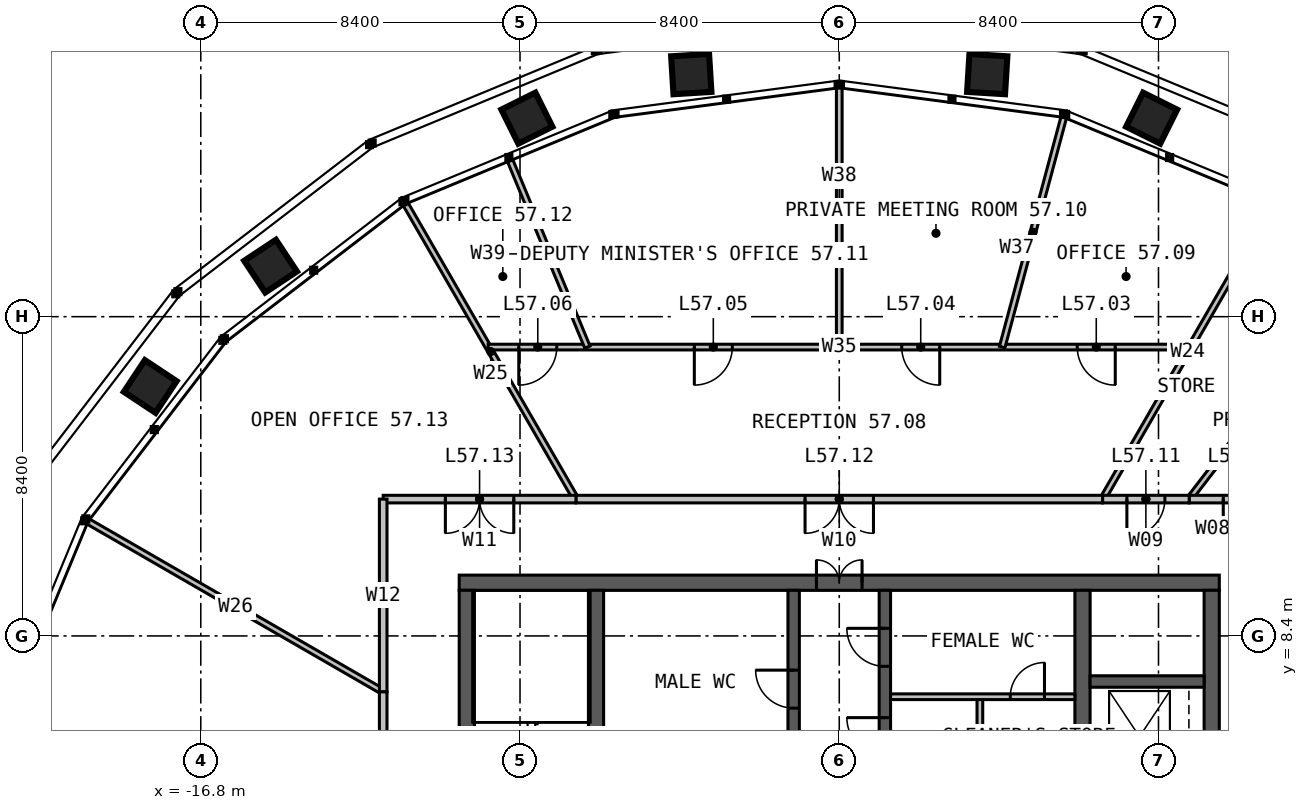
"""IFC4 building model, lengths in metres.
Left out: names, types, materials, properties, quantities, classifications, styles, units other than length and angle.
Written with IfcOpenShell. Run it as: python <this file> out.ifc"""

import sys

from ifc_helpers import new_model, si_unit, direction, frame, frame_2d, origin, place, context, subcontext, project, spatial, rectangle, extrude, element, fill, save


model = new_model("IFC4")
c1 = context("Model", 3, precision=1e-05, world=origin(), true_north=direction((0.0, 1.0)))
c2 = subcontext(c1, "Body", "Model", "MODEL_VIEW")
j1 = project(units=[si_unit("LENGTHUNIT", "METRE"), si_unit("PLANEANGLEUNIT", "RADIAN")], contexts=[c1])
p1 = place(None, origin())
s1 = spatial("IfcSite", under=j1, at=p1, CompositionType="ELEMENT")
p2 = place(p1, origin())
s2 = spatial("IfcBuilding", under=s1, at=p2, CompositionType="ELEMENT")
p3 = place(p2, frame((0.0, 0.0, 236.0)))
s3 = spatial("IfcBuildingStorey", under=s2, at=p3, CompositionType="ELEMENT", Elevation=236.0)
p4 = place(p3, frame((-10.0, 9.8, 0.0), z_axis=(0.0, 0.0, 1.0), x_axis=(1.0, 0.0, 0.0)))
e1 = element("IfcWall", 1, at=p4, inside=s3, PredefinedType="SOLIDWALL", context=c2, shape_type="SweptSolid", body=[
    extrude(rectangle(XDim=20.0, YDim=0.4, at=frame_2d((10.0, 0.0))), origin(), (0.0, 0.0, 1.0), 4.0),
])
p5 = place(p4, frame((9.4, 0.0, 0.0)))
e2 = element("IfcOpeningElement", 2, at=p5, cuts=e1, PredefinedType="OPENING", context=c2, shape_type="SweptSolid", body=[
    extrude(rectangle(XDim=1.2, YDim=2.2, at=frame_2d((0.6, 1.1))), frame((0.0, 0.21, 0.0), z_axis=(0.0, -1.0, 0.0), x_axis=(1.0, 0.0, 0.0)), (0.0, 0.0, 1.0), 0.42),
])
for number, where, z_axis, x_axis in (
    (3, (9.8, -9.6, 0.0), (0.0, 0.0, 1.0), (0.0, 1.0, 0.0)),
    (4, (-9.8, 9.6, 0.0), (0.0, 0.0, 1.0), (0.0, -1.0, 0.0)),
):
    element("IfcWall", number, at=place(p3, frame(where, z_axis=z_axis, x_axis=x_axis)), inside=s3, PredefinedType="SOLIDWALL", context=c2, shape_type="SweptSolid", body=[
        extrude(rectangle(XDim=19.2, YDim=0.4, at=frame_2d((9.6, 0.0))), origin(), (0.0, 0.0, 1.0), 4.0),
    ])
p6 = place(p3, frame((-6.4, -9.6, 0.0), z_axis=(0.0, 0.0, 1.0), x_axis=(0.0, 1.0, 0.0)))
e5 = element("IfcWall", 5, at=p6, inside=s3, PredefinedType="SOLIDWALL", context=c2, shape_type="SweptSolid", body=[
    extrude(rectangle(XDim=19.2, YDim=0.4, at=frame_2d((9.6, 0.0))), origin(), (0.0, 0.0, 1.0), 4.0),
])
p7 = place(p6, frame((9.1, 0.0, 0.0)))
e6 = element("IfcOpeningElement", 6, at=p7, cuts=e5, PredefinedType="OPENING", context=c2, shape_type="SweptSolid", body=[
    extrude(rectangle(XDim=1.0, YDim=2.2, at=frame_2d((0.5, 1.1))), frame((0.0, 0.21, 0.0), z_axis=(0.0, -1.0, 0.0), x_axis=(1.0, 0.0, 0.0)), (0.0, 0.0, 1.0), 0.42),
])
p8 = place(p3, frame((6.4, 9.6, 0.0), z_axis=(0.0, 0.0, 1.0), x_axis=(0.0, -1.0, 0.0)))
e7 = element("IfcWall", 7, at=p8, inside=s3, PredefinedType="SOLIDWALL", context=c2, shape_type="SweptSolid", body=[
    extrude(rectangle(XDim=19.2, YDim=0.4, at=frame_2d((9.6, 0.0))), origin(), (0.0, 0.0, 1.0), 4.0),
])
p9 = place(p8, frame((9.1, 0.0, 0.0)))
e8 = element("IfcOpeningElement", 8, at=p9, cuts=e7, PredefinedType="OPENING", context=c2, shape_type="SweptSolid", body=[
    extrude(rectangle(XDim=1.0, YDim=2.2, at=frame_2d((0.5, 1.1))), frame((0.0, 0.21, 0.0), z_axis=(0.0, -1.0, 0.0), x_axis=(1.0, 0.0, 0.0)), (0.0, 0.0, 1.0), 0.42),
])
p10 = place(p3, frame((-1.2, 1.45, 0.0), z_axis=(0.0, 0.0, 1.0), x_axis=(0.0, 1.0, 0.0)))
e9 = element("IfcWall", 9, at=p10, inside=s3, PredefinedType="SOLIDWALL", context=c2, shape_type="SweptSolid", body=[
    extrude(rectangle(XDim=8.15, YDim=0.3, at=frame_2d((4.075, 0.0))), origin(), (0.0, 0.0, 1.0), 4.0),
])
p11 = place(p10, frame((5.05, 0.0, 0.0)))
e10 = element("IfcOpeningElement", 10, at=p11, cuts=e9, PredefinedType="OPENING", context=c2, shape_type="SweptSolid", body=[
    extrude(rectangle(XDim=1.0, YDim=2.2, at=frame_2d((0.5, 1.1))), frame((0.0, 0.16, 0.0), z_axis=(0.0, -1.0, 0.0), x_axis=(1.0, 0.0, 0.0)), (0.0, 0.0, 1.0), 0.32),
])
p12 = place(p3, frame((1.2, 1.45, 0.0), z_axis=(0.0, 0.0, 1.0), x_axis=(0.0, 1.0, 0.0)))
e11 = element("IfcWall", 11, at=p12, inside=s3, PredefinedType="SOLIDWALL", context=c2, shape_type="SweptSolid", body=[
    extrude(rectangle(XDim=8.15, YDim=0.3, at=frame_2d((4.075, 0.0))), origin(), (0.0, 0.0, 1.0), 4.0),
])
p13 = place(p12, frame((3.8, 0.0, 0.0)))
e12 = element("IfcOpeningElement", 12, at=p13, cuts=e11, PredefinedType="OPENING", context=c2, shape_type="SweptSolid", body=[
    extrude(rectangle(XDim=1.0, YDim=2.2, at=frame_2d((0.5, 1.1))), frame((0.0, 0.16, 0.0), z_axis=(0.0, -1.0, 0.0), x_axis=(1.0, 0.0, 0.0)), (0.0, 0.0, 1.0), 0.32),
])
p14 = place(p12, frame((6.15, 0.0, 0.0)))
e13 = element("IfcOpeningElement", 13, at=p14, cuts=e11, PredefinedType="OPENING", context=c2, shape_type="SweptSolid", body=[
    extrude(rectangle(XDim=1.0, YDim=2.2, at=frame_2d((0.5, 1.1))), frame((0.0, 0.16, 0.0), z_axis=(0.0, -1.0, 0.0), x_axis=(1.0, 0.0, 0.0)), (0.0, 0.0, 1.0), 0.32),
])
p15 = place(p3, frame((6.6, 7.2, 0.0), z_axis=(0.0, 0.0, 1.0), x_axis=(1.0, 0.0, 0.0)))
e14 = element("IfcWall", 14, at=p15, inside=s3, PredefinedType="SOLIDWALL", context=c2, shape_type="SweptSolid", body=[
    extrude(rectangle(XDim=3.0, YDim=0.3, at=frame_2d((1.5, 0.0))), origin(), (0.0, 0.0, 1.0), 4.0),
])
p16 = place(p3, frame((1.35, 6.8, 0.0), z_axis=(0.0, 0.0, 1.0), x_axis=(1.0, 0.0, 0.0)))
e15 = element("IfcWall", 15, at=p16, inside=s3, PredefinedType="PARTITIONING", context=c2, shape_type="SweptSolid", body=[
    extrude(rectangle(XDim=4.85, YDim=0.15, at=frame_2d((2.425, 0.0))), origin(), (0.0, 0.0, 1.0), 3.75),
])
p17 = place(p16, frame((3.15, 0.0, 0.0)))
e16 = element("IfcOpeningElement", 16, at=p17, cuts=e15, PredefinedType="OPENING", context=c2, shape_type="SweptSolid", body=[
    extrude(rectangle(XDim=0.9, YDim=2.2, at=frame_2d((0.45, 1.1))), frame((0.0, 0.085, 0.0), z_axis=(0.0, -1.0, 0.0), x_axis=(1.0, 0.0, 0.0)), (0.0, 0.0, 1.0), 0.17),
])
p18 = place(p3, frame((3.7, 4.75, 0.0), z_axis=(0.0, 0.0, 1.0), x_axis=(0.0, 1.0, 0.0)))
e17 = element("IfcWall", 17, at=p18, inside=s3, PredefinedType="PARTITIONING", context=c2, shape_type="SweptSolid", body=[
    extrude(rectangle(XDim=1.975, YDim=0.15, at=frame_2d((0.988, 0.0))), origin(), (0.0, 0.0, 1.0), 3.75),
])
p19 = place(p3, frame((9.208, 12.0, 0.0), z_axis=(0.0, 0.0, 1.0), x_axis=(0.608753999833, 0.793359040843, 0.0)))
e18 = element("IfcWall", 18, at=p19, inside=s3, PredefinedType="PARTITIONING", context=c2, shape_type="SweptSolid", body=[
    extrude(rectangle(XDim=7.501, YDim=0.15, at=frame_2d((3.75, 0.0))), origin(), (0.0, 0.0, 1.0), 2.79),
])
for number, where, z_axis, x_axis in (
    (19, (6.928, 12.0, 0.0), (0.0, 0.0, 1.0), (0.5, 0.866, 0.0)),
    (20, (-6.928, 12.0, 0.0), (0.0, 0.0, 1.0), (-0.5, 0.866, 0.0)),
    (21, (-12.0, 6.928, 0.0), (0.0, 0.0, 1.0), (-0.866, 0.5, 0.0)),
):
    element("IfcWall", number, at=place(p3, frame(where, z_axis=z_axis, x_axis=x_axis)), inside=s3, PredefinedType="PARTITIONING", context=c2, shape_type="SweptSolid", body=[
        extrude(rectangle(XDim=8.966, YDim=0.15, at=frame_2d((4.483, 0.0))), origin(), (0.0, 0.0, 1.0), 2.79),
    ])
p20 = place(p3, frame((12.0, 12.0, 0.0), z_axis=(0.0, 0.0, 1.0), x_axis=(-1.0, 0.0, 0.0)))
e22 = element("IfcWall", 22, at=p20, inside=s3, PredefinedType="PARTITIONING", context=c2, shape_type="SweptSolid", body=[
    extrude(rectangle(XDim=2.792, YDim=0.2, at=frame_2d((1.396, 0.0))), origin(), (0.0, 0.0, 1.0), 3.8),
])
p21 = place(p20, frame((0.896, 0.0, 0.0)))
e23 = element("IfcOpeningElement", 23, at=p21, cuts=e22, PredefinedType="OPENING", context=c2, shape_type="SweptSolid", body=[
    extrude(rectangle(XDim=1.0, YDim=2.2, at=frame_2d((0.5, 1.1))), frame((0.0, 0.11, 0.0), z_axis=(0.0, -1.0, 0.0), x_axis=(1.0, 0.0, 0.0)), (0.0, 0.0, 1.0), 0.22),
])
p22 = place(p3, frame((9.208, 12.0, 0.0), z_axis=(0.0, 0.0, 1.0), x_axis=(-1.0, 0.0, 0.0)))
e24 = element("IfcWall", 24, at=p22, inside=s3, PredefinedType="PARTITIONING", context=c2, shape_type="SweptSolid", body=[
    extrude(rectangle(XDim=2.28, YDim=0.2, at=frame_2d((1.14, 0.0))), origin(), (0.0, 0.0, 1.0), 3.8),
])
p23 = place(p22, frame((0.64, 0.0, 0.0)))
e25 = element("IfcOpeningElement", 25, at=p23, cuts=e24, PredefinedType="OPENING", context=c2, shape_type="SweptSolid", body=[
    extrude(rectangle(XDim=1.0, YDim=2.2, at=frame_2d((0.5, 1.1))), frame((0.0, 0.11, 0.0), z_axis=(0.0, -1.0, 0.0), x_axis=(1.0, 0.0, 0.0)), (0.0, 0.0, 1.0), 0.22),
])
p24 = place(p3, frame((9.238, 16.0, 0.0), z_axis=(0.0, 0.0, 1.0), x_axis=(-1.0, 0.0, 0.0)))
e26 = element("IfcWall", 26, at=p24, inside=s3, PredefinedType="PARTITIONING", context=c2, shape_type="SweptSolid", body=[
    extrude(rectangle(XDim=18.475, YDim=0.15, at=frame_2d((9.238, 0.0))), origin(), (0.0, 0.0, 1.0), 2.79),
])
p25 = place(p24, frame((1.975, 0.0, 0.0)))
e27 = element("IfcOpeningElement", 27, at=p25, cuts=e26, PredefinedType="OPENING", context=c2, shape_type="SweptSolid", body=[
    extrude(rectangle(XDim=1.0, YDim=2.2, at=frame_2d((0.5, 1.1))), frame((0.0, 0.085, 0.0), z_axis=(0.0, -1.0, 0.0), x_axis=(1.0, 0.0, 0.0)), (0.0, 0.0, 1.0), 0.17),
])
p26 = place(p24, frame((6.594, 0.0, 0.0)))
e28 = element("IfcOpeningElement", 28, at=p26, cuts=e26, PredefinedType="OPENING", context=c2, shape_type="SweptSolid", body=[
    extrude(rectangle(XDim=1.0, YDim=2.2, at=frame_2d((0.5, 1.1))), frame((0.0, 0.085, 0.0), z_axis=(0.0, -1.0, 0.0), x_axis=(1.0, 0.0, 0.0)), (0.0, 0.0, 1.0), 0.17),
])
p27 = place(p24, frame((12.051, 0.0, 0.0)))
e29 = element("IfcOpeningElement", 29, at=p27, cuts=e26, PredefinedType="OPENING", context=c2, shape_type="SweptSolid", body=[
    extrude(rectangle(XDim=1.0, YDim=2.2, at=frame_2d((0.5, 1.1))), frame((0.0, 0.085, 0.0), z_axis=(0.0, -1.0, 0.0), x_axis=(1.0, 0.0, 0.0)), (0.0, 0.0, 1.0), 0.17),
])
p28 = place(p24, frame((16.67, 0.0, 0.0)))
e30 = element("IfcOpeningElement", 30, at=p28, cuts=e26, PredefinedType="OPENING", context=c2, shape_type="SweptSolid", body=[
    extrude(rectangle(XDim=1.0, YDim=2.2, at=frame_2d((0.5, 1.1))), frame((0.0, 0.085, 0.0), z_axis=(0.0, -1.0, 0.0), x_axis=(1.0, 0.0, 0.0)), (0.0, 0.0, 1.0), 0.17),
])
p29 = place(p3, frame((4.287, 16.0, 0.0), z_axis=(0.0, 0.0, 1.0), x_axis=(0.258813437513, 0.965927328821, 0.0)))
e31 = element("IfcWall", 31, at=p29, inside=s3, PredefinedType="PARTITIONING", context=c2, shape_type="SweptSolid", body=[
    extrude(rectangle(XDim=6.258, YDim=0.15, at=frame_2d((3.129, 0.0))), origin(), (0.0, 0.0, 1.0), 2.79),
])
p30 = place(p3, frame((0.0, 16.0, 0.0), z_axis=(0.0, 0.0, 1.0), x_axis=(0.0, 1.0, 0.0)))
e32 = element("IfcWall", 32, at=p30, inside=s3, PredefinedType="PARTITIONING", context=c2, shape_type="SweptSolid", body=[
    extrude(rectangle(XDim=6.822, YDim=0.15, at=frame_2d((3.411, 0.0))), origin(), (0.0, 0.0, 1.0), 2.79),
])
p31 = place(p3, frame((-6.627, 16.0, 0.0), z_axis=(0.0, 0.0, 1.0), x_axis=(-0.382678083764, 0.923881747956, 0.0)))
e33 = element("IfcWall", 33, at=p31, inside=s3, PredefinedType="PARTITIONING", context=c2, shape_type="SweptSolid", body=[
    extrude(rectangle(XDim=5.309, YDim=0.15, at=frame_2d((2.654, 0.0))), origin(), (0.0, 0.0, 1.0), 2.79),
])
p32 = place(p3, frame((6.928, 12.0, 0.0), z_axis=(0.0, 0.0, 1.0), x_axis=(-1.0, 0.0, 0.0)))
e34 = element("IfcWall", 34, at=p32, inside=s3, PredefinedType="PARTITIONING", context=c2, shape_type="SweptSolid", body=[
    extrude(rectangle(XDim=13.856, YDim=0.2, at=frame_2d((6.928, 0.0))), origin(), (0.0, 0.0, 1.0), 3.8),
])
p33 = place(p32, frame((6.028, 0.0, 0.0)))
e35 = element("IfcOpeningElement", 35, at=p33, cuts=e34, PredefinedType="OPENING", context=c2, shape_type="SweptSolid", body=[
    extrude(rectangle(XDim=1.8, YDim=2.2, at=frame_2d((0.9, 1.1))), frame((0.0, 0.11, 0.0), z_axis=(0.0, -1.0, 0.0), x_axis=(1.0, 0.0, 0.0)), (0.0, 0.0, 1.0), 0.22),
])
p34 = place(p3, frame((-6.928, 12.0, 0.0), z_axis=(0.0, 0.0, 1.0), x_axis=(-1.0, 0.0, 0.0)))
e36 = element("IfcWall", 36, at=p34, inside=s3, PredefinedType="PARTITIONING", context=c2, shape_type="SweptSolid", body=[
    extrude(rectangle(XDim=5.072, YDim=0.2, at=frame_2d((2.536, 0.0))), origin(), (0.0, 0.0, 1.0), 3.8),
])
p35 = place(p34, frame((1.636, 0.0, 0.0)))
e37 = element("IfcOpeningElement", 37, at=p35, cuts=e36, PredefinedType="OPENING", context=c2, shape_type="SweptSolid", body=[
    extrude(rectangle(XDim=1.8, YDim=2.2, at=frame_2d((0.9, 1.1))), frame((0.0, 0.11, 0.0), z_axis=(0.0, -1.0, 0.0), x_axis=(1.0, 0.0, 0.0)), (0.0, 0.0, 1.0), 0.22),
])
p36 = place(p3, frame((-12.0, 12.0, 0.0), z_axis=(0.0, 0.0, 1.0), x_axis=(0.0, -1.0, 0.0)))
e38 = element("IfcWall", 38, at=p36, inside=s3, PredefinedType="PARTITIONING", context=c2, shape_type="SweptSolid", body=[
    extrude(rectangle(XDim=5.072, YDim=0.2, at=frame_2d((2.536, 0.0))), origin(), (0.0, 0.0, 1.0), 3.8),
])
p37 = place(p3, frame((-12.0, 6.928, 0.0), z_axis=(0.0, 0.0, 1.0), x_axis=(0.0, -1.0, 0.0)))
e39 = element("IfcWall", 39, at=p37, inside=s3, PredefinedType="PARTITIONING", context=c2, shape_type="SweptSolid", body=[
    extrude(rectangle(XDim=13.856, YDim=0.2, at=frame_2d((6.928, 0.0))), origin(), (0.0, 0.0, 1.0), 3.8),
])
p38 = place(p37, frame((6.028, 0.0, 0.0)))
e40 = element("IfcOpeningElement", 40, at=p38, cuts=e39, PredefinedType="OPENING", context=c2, shape_type="SweptSolid", body=[
    extrude(rectangle(XDim=1.8, YDim=2.2, at=frame_2d((0.9, 1.1))), frame((0.0, 0.11, 0.0), z_axis=(0.0, -1.0, 0.0), x_axis=(1.0, 0.0, 0.0)), (0.0, 0.0, 1.0), 0.22),
])
p39 = place(p5, origin())
e41 = element("IfcDoor", 41, at=p39, inside=s3, OperationType="DOUBLE_DOOR_SINGLE_SWING", PredefinedType="DOOR", context=c2, shape_type="SweptSolid", body=[
    extrude(rectangle(XDim=1.2, YDim=2.2, at=frame_2d((0.6, 1.1))), frame((0.0, 0.025, 0.0), z_axis=(0.0, -1.0, 0.0), x_axis=(1.0, 0.0, 0.0)), (0.0, 0.0, 1.0), 0.05),
])
fill(e2, e41)
p40 = place(p11, origin())
e42 = element("IfcDoor", 42, at=p40, inside=s3, OperationType="SINGLE_SWING_RIGHT", PredefinedType="DOOR", context=c2, shape_type="SweptSolid", body=[
    extrude(rectangle(XDim=1.0, YDim=2.2, at=frame_2d((0.5, 1.1))), frame((0.0, 0.025, 0.0), z_axis=(0.0, -1.0, 0.0), x_axis=(1.0, 0.0, 0.0)), (0.0, 0.0, 1.0), 0.05),
])
fill(e10, e42)
p41 = place(p13, origin())
e43 = element("IfcDoor", 43, at=p41, inside=s3, OperationType="SINGLE_SWING_RIGHT", PredefinedType="DOOR", context=c2, shape_type="SweptSolid", body=[
    extrude(rectangle(XDim=1.0, YDim=2.2, at=frame_2d((0.5, 1.1))), frame((0.0, 0.025, 0.0), z_axis=(0.0, -1.0, 0.0), x_axis=(1.0, 0.0, 0.0)), (0.0, 0.0, 1.0), 0.05),
])
fill(e12, e43)
p42 = place(p14, origin())
e44 = element("IfcDoor", 44, at=p42, inside=s3, OperationType="SINGLE_SWING_RIGHT", PredefinedType="DOOR", context=c2, shape_type="SweptSolid", body=[
    extrude(rectangle(XDim=1.0, YDim=2.2, at=frame_2d((0.5, 1.1))), frame((0.0, 0.025, 0.0), z_axis=(0.0, -1.0, 0.0), x_axis=(1.0, 0.0, 0.0)), (0.0, 0.0, 1.0), 0.05),
])
fill(e13, e44)
p43 = place(p17, origin())
e45 = element("IfcDoor", 45, at=p43, inside=s3, OperationType="SINGLE_SWING_RIGHT", PredefinedType="DOOR", context=c2, shape_type="SweptSolid", body=[
    extrude(rectangle(XDim=0.9, YDim=2.2, at=frame_2d((0.45, 1.1))), frame((0.0, 0.025, 0.0), z_axis=(0.0, -1.0, 0.0), x_axis=(1.0, 0.0, 0.0)), (0.0, 0.0, 1.0), 0.05),
])
fill(e16, e45)
p44 = place(p21, origin())
e46 = element("IfcDoor", 46, at=p44, inside=s3, OperationType="SINGLE_SWING_RIGHT", PredefinedType="DOOR", context=c2, shape_type="SweptSolid", body=[
    extrude(rectangle(XDim=1.0, YDim=2.2, at=frame_2d((0.5, 1.1))), frame((0.0, 0.025, 0.0), z_axis=(0.0, -1.0, 0.0), x_axis=(1.0, 0.0, 0.0)), (0.0, 0.0, 1.0), 0.05),
])
fill(e23, e46)
p45 = place(p23, origin())
e47 = element("IfcDoor", 47, at=p45, inside=s3, OperationType="SINGLE_SWING_RIGHT", PredefinedType="DOOR", context=c2, shape_type="SweptSolid", body=[
    extrude(rectangle(XDim=1.0, YDim=2.2, at=frame_2d((0.5, 1.1))), frame((0.0, 0.025, 0.0), z_axis=(0.0, -1.0, 0.0), x_axis=(1.0, 0.0, 0.0)), (0.0, 0.0, 1.0), 0.05),
])
fill(e25, e47)
p46 = place(p25, origin())
e48 = element("IfcDoor", 48, at=p46, inside=s3, OperationType="SINGLE_SWING_LEFT", PredefinedType="DOOR", context=c2, shape_type="SweptSolid", body=[
    extrude(rectangle(XDim=1.0, YDim=2.2, at=frame_2d((0.5, 1.1))), frame((0.0, 0.025, 0.0), z_axis=(0.0, -1.0, 0.0), x_axis=(1.0, 0.0, 0.0)), (0.0, 0.0, 1.0), 0.05),
])
fill(e27, e48)
p47 = place(p26, origin())
e49 = element("IfcDoor", 49, at=p47, inside=s3, OperationType="SINGLE_SWING_LEFT", PredefinedType="DOOR", context=c2, shape_type="SweptSolid", body=[
    extrude(rectangle(XDim=1.0, YDim=2.2, at=frame_2d((0.5, 1.1))), frame((0.0, 0.025, 0.0), z_axis=(0.0, -1.0, 0.0), x_axis=(1.0, 0.0, 0.0)), (0.0, 0.0, 1.0), 0.05),
])
fill(e28, e49)
p48 = place(p27, origin())
e50 = element("IfcDoor", 50, at=p48, inside=s3, OperationType="SINGLE_SWING_RIGHT", PredefinedType="DOOR", context=c2, shape_type="SweptSolid", body=[
    extrude(rectangle(XDim=1.0, YDim=2.2, at=frame_2d((0.5, 1.1))), frame((0.0, 0.025, 0.0), z_axis=(0.0, -1.0, 0.0), x_axis=(1.0, 0.0, 0.0)), (0.0, 0.0, 1.0), 0.05),
])
fill(e29, e50)
p49 = place(p28, origin())
e51 = element("IfcDoor", 51, at=p49, inside=s3, OperationType="SINGLE_SWING_RIGHT", PredefinedType="DOOR", context=c2, shape_type="SweptSolid", body=[
    extrude(rectangle(XDim=1.0, YDim=2.2, at=frame_2d((0.5, 1.1))), frame((0.0, 0.025, 0.0), z_axis=(0.0, -1.0, 0.0), x_axis=(1.0, 0.0, 0.0)), (0.0, 0.0, 1.0), 0.05),
])
fill(e30, e51)
p50 = place(p33, origin())
e52 = element("IfcDoor", 52, at=p50, inside=s3, OperationType="DOUBLE_DOOR_SINGLE_SWING", PredefinedType="DOOR", context=c2, shape_type="SweptSolid", body=[
    extrude(rectangle(XDim=1.8, YDim=2.2, at=frame_2d((0.9, 1.1))), frame((0.0, 0.025, 0.0), z_axis=(0.0, -1.0, 0.0), x_axis=(1.0, 0.0, 0.0)), (0.0, 0.0, 1.0), 0.05),
])
fill(e35, e52)
p51 = place(p35, origin())
e53 = element("IfcDoor", 53, at=p51, inside=s3, OperationType="DOUBLE_DOOR_SINGLE_SWING", PredefinedType="DOOR", context=c2, shape_type="SweptSolid", body=[
    extrude(rectangle(XDim=1.8, YDim=2.2, at=frame_2d((0.9, 1.1))), frame((0.0, 0.025, 0.0), z_axis=(0.0, -1.0, 0.0), x_axis=(1.0, 0.0, 0.0)), (0.0, 0.0, 1.0), 0.05),
])
fill(e37, e53)
save(model, sys.argv[1])
